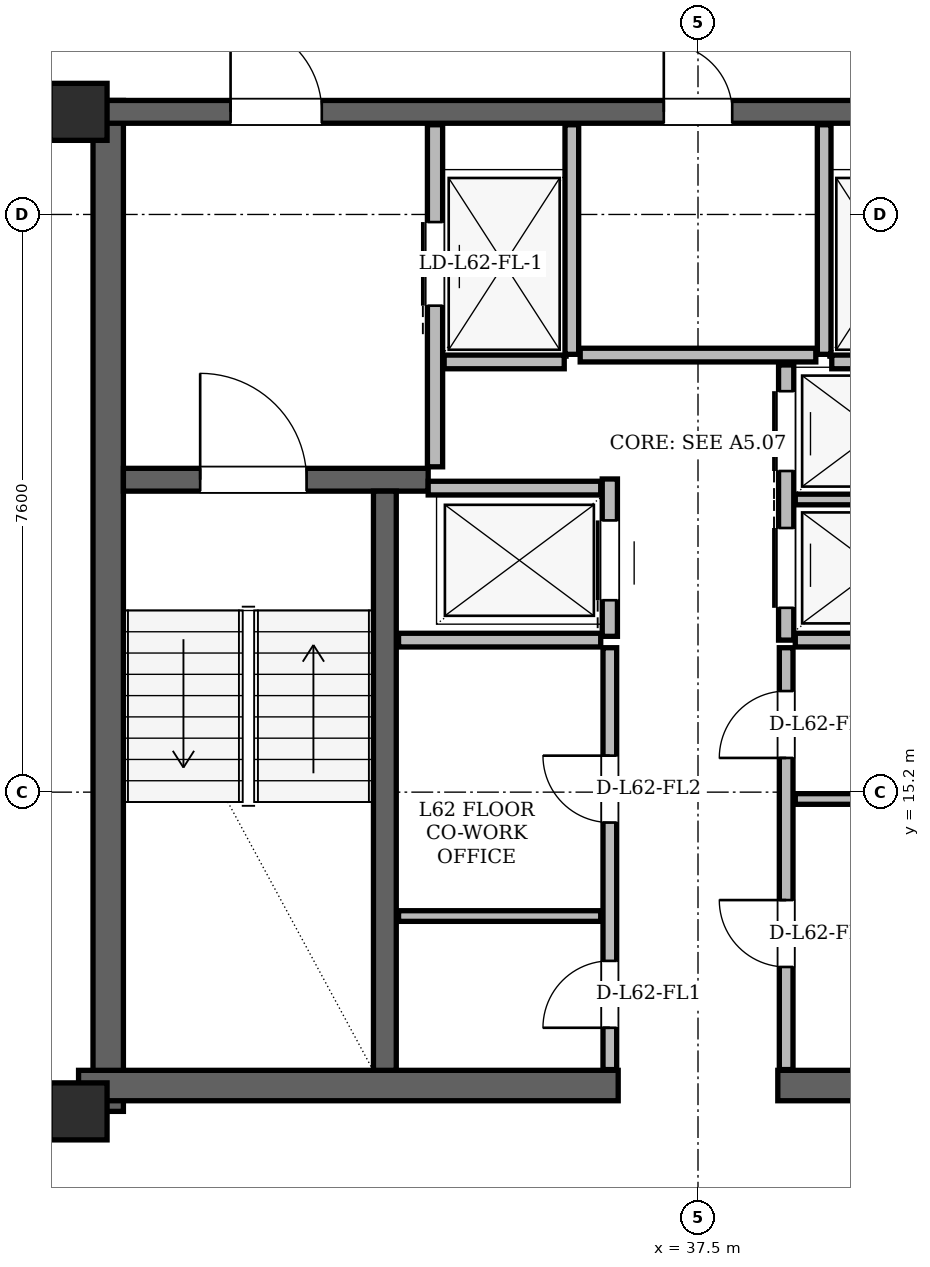
"""IFC4 building model, lengths in metres.
Left out: names, types, materials, properties, quantities, classifications, styles, units other than length and angle.
Written with IfcOpenShell. Run it as: python <this file> out.ifc"""

import sys

from ifc_helpers import new_model, si_unit, direction, frame, frame_2d, origin, origin_2d, place, context, subcontext, project, spatial, rectangle, hollow_rectangle, extrude, element, fill, save


model = new_model("IFC4")
c1 = context("Model", 3, precision=1e-05, world=origin(), true_north=direction((0.0, 1.0)))
c2 = subcontext(c1, "Body", "Model", "MODEL_VIEW")
j1 = project(units=[si_unit("LENGTHUNIT", "METRE"), si_unit("PLANEANGLEUNIT", "RADIAN")], contexts=[c1])
p1 = place(None, origin())
s1 = spatial("IfcSite", under=j1, at=p1, CompositionType="ELEMENT")
p2 = place(p1, origin())
s2 = spatial("IfcBuilding", under=s1, at=p2, CompositionType="ELEMENT")
p3 = place(p2, frame((0.0, 0.0, 234.3)))
s3 = spatial("IfcBuildingStorey", under=s2, at=p3, CompositionType="ELEMENT", Elevation=234.3)
for number, where, z_axis, x_axis in (
    (1, (29.35, 11.0, 0.0), (0.0, 0.0, 1.0), (1.0, 0.0, 0.0)),
    (2, (29.35, 24.15, 0.0), (0.0, 0.0, 1.0), (1.0, 0.0, 0.0)),
):
    element("IfcColumn", number, at=place(p3, frame(where, z_axis=z_axis, x_axis=x_axis)), inside=s3, PredefinedType="COLUMN", context=c2, shape_type="SweptSolid", body=[
        extrude(hollow_rectangle(XDim=0.75, YDim=0.75, WallThickness=0.06, at=origin_2d()), origin(), (0.0, 0.0, 1.0), 3.6),
    ])
p4 = place(p3, frame((29.74, 11.0, 0.0), z_axis=(0.0, 0.0, 1.0), x_axis=(0.0, 1.0, 0.0)))
e3 = element("IfcWall", 3, at=p4, inside=s3, PredefinedType="SHEAR", context=c2, shape_type="SweptSolid", body=[
    extrude(rectangle(XDim=13.3, YDim=0.4, at=frame_2d((6.65, 0.0))), origin(), (0.0, 0.0, 1.0), 3.38),
])
for number, where, z_axis, x_axis in (
    (4, (29.35, 11.34, 0.0), (0.0, 0.0, 1.0), (1.0, 0.0, 0.0)),
    (5, (38.55, 11.34, 0.0), (0.0, 0.0, 1.0), (1.0, 0.0, 0.0)),
):
    element("IfcWall", number, at=place(p3, frame(where, z_axis=z_axis, x_axis=x_axis)), inside=s3, PredefinedType="SHEAR", context=c2, shape_type="SweptSolid", body=[
        extrude(rectangle(XDim=7.1, YDim=0.4, at=frame_2d((3.55, 0.0))), origin(), (0.0, 0.0, 1.0), 3.38),
    ])
p5 = place(p3, frame((29.65, 24.15, 0.0), z_axis=(0.0, 0.0, 1.0), x_axis=(1.0, 0.0, 0.0)))
e6 = element("IfcWall", 6, at=p5, inside=s3, PredefinedType="SHEAR", context=c2, shape_type="SweptSolid", body=[
    extrude(rectangle(XDim=15.7, YDim=0.3, at=frame_2d((7.85, 0.0))), origin(), (0.0, 0.0, 1.0), 3.38),
])
p6 = place(p5, frame((1.7, 0.0, 0.0)))
e7 = element("IfcOpeningElement", 7, at=p6, cuts=e6, PredefinedType="OPENING", context=c2, shape_type="SweptSolid", body=[
    extrude(rectangle(XDim=1.2, YDim=2.2, at=frame_2d((0.6, 1.1))), frame((0.0, 0.15, 0.0), z_axis=(0.0, -1.0, 0.0), x_axis=(1.0, 0.0, 0.0)), (0.0, 0.0, 1.0), 0.3),
])
p7 = place(p5, frame((12.8, 0.0, 0.0)))
e8 = element("IfcOpeningElement", 8, at=p7, cuts=e6, PredefinedType="OPENING", context=c2, shape_type="SweptSolid", body=[
    extrude(rectangle(XDim=1.2, YDim=2.2, at=frame_2d((0.6, 1.1))), frame((0.0, 0.15, 0.0), z_axis=(0.0, -1.0, 0.0), x_axis=(1.0, 0.0, 0.0)), (0.0, 0.0, 1.0), 0.3),
])
p8 = place(p5, frame((7.4, 0.0, 0.0)))
e9 = element("IfcOpeningElement", 9, at=p8, cuts=e6, PredefinedType="OPENING", context=c2, shape_type="SweptSolid", body=[
    extrude(rectangle(XDim=0.9, YDim=2.05, at=frame_2d((0.45, 1.025))), frame((0.0, 0.15, 0.0), z_axis=(0.0, -1.0, 0.0), x_axis=(1.0, 0.0, 0.0)), (0.0, 0.0, 1.0), 0.3),
])
p9 = place(p3, frame((29.94, 19.31, 0.0), z_axis=(0.0, 0.0, 1.0), x_axis=(1.0, 0.0, 0.0)))
e10 = element("IfcWall", 10, at=p9, inside=s3, PredefinedType="SHEAR", context=c2, shape_type="SweptSolid", body=[
    extrude(rectangle(XDim=4.01, YDim=0.3, at=frame_2d((2.005, 0.0))), origin(), (0.0, 0.0, 1.0), 3.38),
])
p10 = place(p9, frame((1.01, 0.0, 0.0)))
e11 = element("IfcOpeningElement", 11, at=p10, cuts=e10, PredefinedType="OPENING", context=c2, shape_type="SweptSolid", body=[
    extrude(rectangle(XDim=1.4, YDim=2.2, at=frame_2d((0.7, 1.1))), frame((0.0, 0.15, 0.0), z_axis=(0.0, -1.0, 0.0), x_axis=(1.0, 0.0, 0.0)), (0.0, 0.0, 1.0), 0.3),
])
p11 = place(p3, frame((33.38, 11.54, 0.0), z_axis=(0.0, 0.0, 1.0), x_axis=(0.0, 1.0, 0.0)))
e12 = element("IfcWall", 12, at=p11, inside=s3, PredefinedType="SHEAR", context=c2, shape_type="SweptSolid", body=[
    extrude(rectangle(XDim=7.62, YDim=0.3, at=frame_2d((3.81, 0.0))), origin(), (0.0, 0.0, 1.0), 3.38),
])
p12 = place(p3, frame((34.482, 43.116, 0.0), z_axis=(0.0, 0.0, 1.0), x_axis=(-0.500000614513, -0.866025048995, 0.0)))
e13 = element("IfcWall", 13, at=p12, inside=s3, PredefinedType="SOLIDWALL", context=c2, shape_type="SweptSolid", body=[
    extrude(rectangle(XDim=36.848, YDim=0.29, at=frame_2d((18.424, 0.0))), origin(), (0.0, 0.0, 1.0), 2.677),
])
p13 = place(p12, frame((8.034, 0.0, 0.0)))
e14 = element("IfcOpeningElement", 14, at=p13, cuts=e13, PredefinedType="OPENING", context=c2, shape_type="SweptSolid", body=[
    extrude(rectangle(XDim=1.5, YDim=2.2, at=frame_2d((0.75, 1.1))), frame((0.0, 0.145, 0.0), z_axis=(0.0, -1.0, 0.0), x_axis=(1.0, 0.0, 0.0)), (0.0, 0.0, 1.0), 0.29),
])
p14 = place(p12, frame((28.559, 0.0, 0.0)))
e15 = element("IfcOpeningElement", 15, at=p14, cuts=e13, PredefinedType="OPENING", context=c2, shape_type="SweptSolid", body=[
    extrude(rectangle(XDim=1.5, YDim=2.2, at=frame_2d((0.75, 1.1))), frame((0.0, 0.145, 0.0), z_axis=(0.0, -1.0, 0.0), x_axis=(1.0, 0.0, 0.0)), (0.0, 0.0, 1.0), 0.29),
])
p15 = place(p12, frame((21.863, 0.0, 0.85)))
e16 = element("IfcOpeningElement", 16, at=p15, cuts=e13, PredefinedType="OPENING", context=c2, shape_type="SweptSolid", body=[
    extrude(rectangle(XDim=2.4, YDim=1.717, at=frame_2d((1.2, 0.858))), frame((0.0, 0.145, 0.0), z_axis=(0.0, -1.0, 0.0), x_axis=(1.0, 0.0, 0.0)), (0.0, 0.0, 1.0), 0.29),
])
p16 = place(p12, frame((34.677, 0.0, 0.85)))
e17 = element("IfcOpeningElement", 17, at=p16, cuts=e13, PredefinedType="OPENING", context=c2, shape_type="SweptSolid", body=[
    extrude(rectangle(XDim=1.2, YDim=1.48, at=frame_2d((0.6, 0.74))), frame((0.0, 0.145, 0.0), z_axis=(0.0, -1.0, 0.0), x_axis=(1.0, 0.0, 0.0)), (0.0, 0.0, 1.0), 0.29),
])
p17 = place(p12, frame((32.477, 0.0, 0.85)))
e18 = element("IfcOpeningElement", 18, at=p17, cuts=e13, PredefinedType="OPENING", context=c2, shape_type="SweptSolid", body=[
    extrude(rectangle(XDim=1.4, YDim=1.6, at=frame_2d((0.7, 0.8))), frame((0.0, 0.145, 0.0), z_axis=(0.0, -1.0, 0.0), x_axis=(1.0, 0.0, 0.0)), (0.0, 0.0, 1.0), 0.29),
])
p18 = place(p12, frame((12.14, 0.0, 0.85)))
e19 = element("IfcOpeningElement", 19, at=p18, cuts=e13, PredefinedType="OPENING", context=c2, shape_type="SweptSolid", body=[
    extrude(rectangle(XDim=1.2, YDim=1.48, at=frame_2d((0.6, 0.74))), frame((0.0, 0.145, 0.0), z_axis=(0.0, -1.0, 0.0), x_axis=(1.0, 0.0, 0.0)), (0.0, 0.0, 1.0), 0.29),
])
p19 = place(p12, frame((16.54, 0.0, 0.85)))
e20 = element("IfcOpeningElement", 20, at=p19, cuts=e13, PredefinedType="OPENING", context=c2, shape_type="SweptSolid", body=[
    extrude(rectangle(XDim=2.0, YDim=1.717, at=frame_2d((1.0, 0.858))), frame((0.0, 0.145, 0.0), z_axis=(0.0, -1.0, 0.0), x_axis=(1.0, 0.0, 0.0)), (0.0, 0.0, 1.0), 0.29),
])
p20 = place(p12, frame((2.059, 0.0, 0.85)))
e21 = element("IfcOpeningElement", 21, at=p20, cuts=e13, PredefinedType="OPENING", context=c2, shape_type="SweptSolid", body=[
    extrude(rectangle(XDim=1.2, YDim=1.48, at=frame_2d((0.6, 0.74))), frame((0.0, 0.145, 0.0), z_axis=(0.0, -1.0, 0.0), x_axis=(1.0, 0.0, 0.0)), (0.0, 0.0, 1.0), 0.29),
])
p21 = place(p3, frame((34.04, 19.48, 0.0), z_axis=(0.0, 0.0, 1.0), x_axis=(0.0, 1.0, 0.0)))
e22 = element("IfcWall", 22, at=p21, inside=s3, PredefinedType="PARTITIONING", context=c2, shape_type="SweptSolid", body=[
    extrude(rectangle(XDim=4.5, YDim=0.2, at=frame_2d((2.25, 0.0))), origin(), (0.0, 0.0, 1.0), 3.38),
])
p22 = place(p21, frame((2.12, 0.0, 0.0)))
e23 = element("IfcOpeningElement", 23, at=p22, cuts=e22, PredefinedType="OPENING", context=c2, shape_type="SweptSolid", body=[
    extrude(rectangle(XDim=1.1, YDim=2.2, at=frame_2d((0.55, 1.1))), frame((0.0, 0.1, 0.0), z_axis=(0.0, -1.0, 0.0), x_axis=(1.0, 0.0, 0.0)), (0.0, 0.0, 1.0), 0.2),
])
p23 = place(p3, frame((35.84, 20.96, 0.0), z_axis=(0.0, 0.0, 1.0), x_axis=(0.0, 1.0, 0.0)))
e24 = element("IfcWall", 24, at=p23, inside=s3, PredefinedType="PARTITIONING", context=c2, shape_type="SweptSolid", body=[
    extrude(rectangle(XDim=3.02, YDim=0.18, at=frame_2d((1.51, 0.0))), origin(), (0.0, 0.0, 1.0), 3.38),
])
p24 = place(p3, frame((34.16, 20.86, 0.0), z_axis=(0.0, 0.0, 1.0), x_axis=(1.0, 0.0, 0.0)))
e25 = element("IfcWall", 25, at=p24, inside=s3, PredefinedType="PARTITIONING", context=c2, shape_type="SweptSolid", body=[
    extrude(rectangle(XDim=1.58, YDim=0.18, at=frame_2d((0.79, 0.0))), origin(), (0.0, 0.0, 1.0), 3.38),
])
p25 = place(p3, frame((39.16, 20.96, 0.0), z_axis=(0.0, 0.0, 1.0), x_axis=(0.0, 1.0, 0.0)))
e26 = element("IfcWall", 26, at=p25, inside=s3, PredefinedType="PARTITIONING", context=c2, shape_type="SweptSolid", body=[
    extrude(rectangle(XDim=3.02, YDim=0.18, at=frame_2d((1.51, 0.0))), origin(), (0.0, 0.0, 1.0), 3.38),
])
p26 = place(p3, frame((39.26, 20.86, 0.0), z_axis=(0.0, 0.0, 1.0), x_axis=(1.0, 0.0, 0.0)))
e27 = element("IfcWall", 27, at=p26, inside=s3, PredefinedType="PARTITIONING", context=c2, shape_type="SweptSolid", body=[
    extrude(rectangle(XDim=1.58, YDim=0.18, at=frame_2d((0.79, 0.0))), origin(), (0.0, 0.0, 1.0), 3.38),
])
p27 = place(p3, frame((36.34, 17.25, 0.0), z_axis=(0.0, 0.0, 1.0), x_axis=(0.0, 1.0, 0.0)))
e28 = element("IfcWall", 28, at=p27, inside=s3, PredefinedType="PARTITIONING", context=c2, shape_type="SweptSolid", body=[
    extrude(rectangle(XDim=2.07, YDim=0.2, at=frame_2d((1.035, 0.0))), origin(), (0.0, 0.0, 1.0), 3.38),
])
p28 = place(p27, frame((0.475, 0.0, 0.0)))
e29 = element("IfcOpeningElement", 29, at=p28, cuts=e28, PredefinedType="OPENING", context=c2, shape_type="SweptSolid", body=[
    extrude(rectangle(XDim=1.05, YDim=2.15, at=frame_2d((0.525, 1.075))), frame((0.0, 0.1, 0.0), z_axis=(0.0, -1.0, 0.0), x_axis=(1.0, 0.0, 0.0)), (0.0, 0.0, 1.0), 0.2),
])
p29 = place(p3, frame((33.95, 19.2, 0.0), z_axis=(0.0, 0.0, 1.0), x_axis=(1.0, 0.0, 0.0)))
e30 = element("IfcWall", 30, at=p29, inside=s3, PredefinedType="PARTITIONING", context=c2, shape_type="SweptSolid", body=[
    extrude(rectangle(XDim=2.27, YDim=0.18, at=frame_2d((1.135, 0.0))), origin(), (0.0, 0.0, 1.0), 3.38),
])
p30 = place(p3, frame((33.56, 17.2, 0.0), z_axis=(0.0, 0.0, 1.0), x_axis=(1.0, 0.0, 0.0)))
e31 = element("IfcWall", 31, at=p30, inside=s3, PredefinedType="PARTITIONING", context=c2, shape_type="SweptSolid", body=[
    extrude(rectangle(XDim=2.66, YDim=0.18, at=frame_2d((1.33, 0.0))), origin(), (0.0, 0.0, 1.0), 3.38),
])
p31 = place(p3, frame((36.34, 11.55, 0.0), z_axis=(0.0, 0.0, 1.0), x_axis=(0.0, 1.0, 0.0)))
e32 = element("IfcWall", 32, at=p31, inside=s3, PredefinedType="PARTITIONING", context=c2, shape_type="SweptSolid", body=[
    extrude(rectangle(XDim=5.55, YDim=0.18, at=frame_2d((2.775, 0.0))), origin(), (0.0, 0.0, 1.0), 3.38),
])
p32 = place(p31, frame((0.55, 0.0, 0.0)))
e33 = element("IfcOpeningElement", 33, at=p32, cuts=e32, PredefinedType="OPENING", context=c2, shape_type="SweptSolid", body=[
    extrude(rectangle(XDim=0.88, YDim=2.08, at=frame_2d((0.44, 1.04))), frame((0.0, 0.09, 0.0), z_axis=(0.0, -1.0, 0.0), x_axis=(1.0, 0.0, 0.0)), (0.0, 0.0, 1.0), 0.18),
])
p33 = place(p31, frame((3.25, 0.0, 0.0)))
e34 = element("IfcOpeningElement", 34, at=p33, cuts=e32, PredefinedType="OPENING", context=c2, shape_type="SweptSolid", body=[
    extrude(rectangle(XDim=0.88, YDim=2.08, at=frame_2d((0.44, 1.04))), frame((0.0, 0.09, 0.0), z_axis=(0.0, -1.0, 0.0), x_axis=(1.0, 0.0, 0.0)), (0.0, 0.0, 1.0), 0.18),
])
p34 = place(p3, frame((33.56, 13.57, 0.0), z_axis=(0.0, 0.0, 1.0), x_axis=(1.0, 0.0, 0.0)))
e35 = element("IfcWall", 35, at=p34, inside=s3, PredefinedType="PARTITIONING", context=c2, shape_type="SweptSolid", body=[
    extrude(rectangle(XDim=2.66, YDim=0.14, at=frame_2d((1.33, 0.0))), origin(), (0.0, 0.0, 1.0), 3.38),
])
p35 = place(p3, frame((38.66, 17.2, 0.0), z_axis=(0.0, 0.0, 1.0), x_axis=(0.0, 1.0, 0.0)))
e36 = element("IfcWall", 36, at=p35, inside=s3, PredefinedType="PARTITIONING", context=c2, shape_type="SweptSolid", body=[
    extrude(rectangle(XDim=3.62, YDim=0.2, at=frame_2d((1.81, 0.0))), origin(), (0.0, 0.0, 1.0), 3.38),
])
p36 = place(p35, frame((0.425, 0.0, 0.0)))
e37 = element("IfcOpeningElement", 37, at=p36, cuts=e36, PredefinedType="OPENING", context=c2, shape_type="SweptSolid", body=[
    extrude(rectangle(XDim=1.05, YDim=2.15, at=frame_2d((0.525, 1.075))), frame((0.0, 0.1, 0.0), z_axis=(0.0, -1.0, 0.0), x_axis=(1.0, 0.0, 0.0)), (0.0, 0.0, 1.0), 0.2),
])
p37 = place(p35, frame((2.225, 0.0, 0.0)))
e38 = element("IfcOpeningElement", 38, at=p37, cuts=e36, PredefinedType="OPENING", context=c2, shape_type="SweptSolid", body=[
    extrude(rectangle(XDim=1.05, YDim=2.15, at=frame_2d((0.525, 1.075))), frame((0.0, 0.1, 0.0), z_axis=(0.0, -1.0, 0.0), x_axis=(1.0, 0.0, 0.0)), (0.0, 0.0, 1.0), 0.2),
])
p38 = place(p3, frame((38.78, 17.2, 0.0), z_axis=(0.0, 0.0, 1.0), x_axis=(1.0, 0.0, 0.0)))
e39 = element("IfcWall", 39, at=p38, inside=s3, PredefinedType="PARTITIONING", context=c2, shape_type="SweptSolid", body=[
    extrude(rectangle(XDim=2.66, YDim=0.18, at=frame_2d((1.33, 0.0))), origin(), (0.0, 0.0, 1.0), 3.38),
])
p39 = place(p3, frame((38.78, 19.05, 0.0), z_axis=(0.0, 0.0, 1.0), x_axis=(1.0, 0.0, 0.0)))
e40 = element("IfcWall", 40, at=p39, inside=s3, PredefinedType="PARTITIONING", context=c2, shape_type="SweptSolid", body=[
    extrude(rectangle(XDim=2.66, YDim=0.14, at=frame_2d((1.33, 0.0))), origin(), (0.0, 0.0, 1.0), 3.38),
])
p40 = place(p3, frame((38.66, 11.55, 0.0), z_axis=(0.0, 0.0, 1.0), x_axis=(0.0, 1.0, 0.0)))
e41 = element("IfcWall", 41, at=p40, inside=s3, PredefinedType="PARTITIONING", context=c2, shape_type="SweptSolid", body=[
    extrude(rectangle(XDim=5.55, YDim=0.18, at=frame_2d((2.775, 0.0))), origin(), (0.0, 0.0, 1.0), 3.38),
])
p41 = place(p40, frame((1.35, 0.0, 0.0)))
e42 = element("IfcOpeningElement", 42, at=p41, cuts=e41, PredefinedType="OPENING", context=c2, shape_type="SweptSolid", body=[
    extrude(rectangle(XDim=0.88, YDim=2.08, at=frame_2d((0.44, 1.04))), frame((0.0, 0.09, 0.0), z_axis=(0.0, -1.0, 0.0), x_axis=(1.0, 0.0, 0.0)), (0.0, 0.0, 1.0), 0.18),
])
p42 = place(p40, frame((4.1, 0.0, 0.0)))
e43 = element("IfcOpeningElement", 43, at=p42, cuts=e41, PredefinedType="OPENING", context=c2, shape_type="SweptSolid", body=[
    extrude(rectangle(XDim=0.88, YDim=2.08, at=frame_2d((0.44, 1.04))), frame((0.0, 0.09, 0.0), z_axis=(0.0, -1.0, 0.0), x_axis=(1.0, 0.0, 0.0)), (0.0, 0.0, 1.0), 0.18),
])
p43 = place(p3, frame((38.78, 15.11, 0.0), z_axis=(0.0, 0.0, 1.0), x_axis=(1.0, 0.0, 0.0)))
e44 = element("IfcWall", 44, at=p43, inside=s3, PredefinedType="PARTITIONING", context=c2, shape_type="SweptSolid", body=[
    extrude(rectangle(XDim=2.66, YDim=0.14, at=frame_2d((1.33, 0.0))), origin(), (0.0, 0.0, 1.0), 3.38),
])
p44 = place(p3, frame((35.95, 20.95, 0.0), z_axis=(0.0, 0.0, 1.0), x_axis=(1.0, 0.0, 0.0)))
e45 = element("IfcWall", 45, at=p44, inside=s3, PredefinedType="PARTITIONING", context=c2, shape_type="SweptSolid", body=[
    extrude(rectangle(XDim=3.1, YDim=0.18, at=frame_2d((1.55, 0.0))), origin(), (0.0, 0.0, 1.0), 3.38),
])
p45 = place(p32, origin())
e46 = element("IfcDoor", 46, at=p45, inside=s3, OperationType="SINGLE_SWING_LEFT", PredefinedType="DOOR", context=c2, shape_type="SweptSolid", body=[
    extrude(rectangle(XDim=0.88, YDim=2.08, at=frame_2d((0.44, 1.04))), frame((0.0, 0.025, 0.0), z_axis=(0.0, -1.0, 0.0), x_axis=(1.0, 0.0, 0.0)), (0.0, 0.0, 1.0), 0.05),
])
fill(e33, e46)
p46 = place(p33, origin())
e47 = element("IfcDoor", 47, at=p46, inside=s3, OperationType="SINGLE_SWING_RIGHT", PredefinedType="DOOR", context=c2, shape_type="SweptSolid", body=[
    extrude(rectangle(XDim=0.88, YDim=2.08, at=frame_2d((0.44, 1.04))), frame((0.0, 0.025, 0.0), z_axis=(0.0, -1.0, 0.0), x_axis=(1.0, 0.0, 0.0)), (0.0, 0.0, 1.0), 0.05),
])
fill(e34, e47)
p47 = place(p41, origin())
e48 = element("IfcDoor", 48, at=p47, inside=s3, OperationType="SINGLE_SWING_RIGHT", PredefinedType="DOOR", context=c2, shape_type="SweptSolid", body=[
    extrude(rectangle(XDim=0.88, YDim=2.08, at=frame_2d((0.44, 1.04))), frame((0.0, 0.025, 0.0), z_axis=(0.0, -1.0, 0.0), x_axis=(1.0, 0.0, 0.0)), (0.0, 0.0, 1.0), 0.05),
])
fill(e42, e48)
p48 = place(p42, origin())
e49 = element("IfcDoor", 49, at=p48, inside=s3, OperationType="SINGLE_SWING_LEFT", PredefinedType="DOOR", context=c2, shape_type="SweptSolid", body=[
    extrude(rectangle(XDim=0.88, YDim=2.08, at=frame_2d((0.44, 1.04))), frame((0.0, 0.025, 0.0), z_axis=(0.0, -1.0, 0.0), x_axis=(1.0, 0.0, 0.0)), (0.0, 0.0, 1.0), 0.05),
])
fill(e43, e49)
p49 = place(p22, origin())
e50 = element("IfcDoor", 50, at=p49, inside=s3, OperationType="SLIDING_TO_LEFT", PredefinedType="DOOR", context=c2, shape_type="SweptSolid", body=[
    extrude(rectangle(XDim=1.1, YDim=2.2, at=frame_2d((0.55, 1.1))), frame((0.0, 0.025, 0.0), z_axis=(0.0, -1.0, 0.0), x_axis=(1.0, 0.0, 0.0)), (0.0, 0.0, 1.0), 0.05),
])
fill(e23, e50)
p50 = place(p28, origin())
e51 = element("IfcDoor", 51, at=p50, inside=s3, OperationType="SLIDING_TO_LEFT", PredefinedType="DOOR", context=c2, shape_type="SweptSolid", body=[
    extrude(rectangle(XDim=1.05, YDim=2.15, at=frame_2d((0.525, 1.075))), frame((0.0, 0.025, 0.0), z_axis=(0.0, -1.0, 0.0), x_axis=(1.0, 0.0, 0.0)), (0.0, 0.0, 1.0), 0.05),
])
fill(e29, e51)
p51 = place(p36, origin())
e52 = element("IfcDoor", 52, at=p51, inside=s3, OperationType="SLIDING_TO_RIGHT", PredefinedType="DOOR", context=c2, shape_type="SweptSolid", body=[
    extrude(rectangle(XDim=1.05, YDim=2.15, at=frame_2d((0.525, 1.075))), frame((0.0, 0.025, 0.0), z_axis=(0.0, -1.0, 0.0), x_axis=(1.0, 0.0, 0.0)), (0.0, 0.0, 1.0), 0.05),
])
fill(e37, e52)
p52 = place(p37, origin())
e53 = element("IfcDoor", 53, at=p52, inside=s3, OperationType="SLIDING_TO_LEFT", PredefinedType="DOOR", context=c2, shape_type="SweptSolid", body=[
    extrude(rectangle(XDim=1.05, YDim=2.15, at=frame_2d((0.525, 1.075))), frame((0.0, 0.025, 0.0), z_axis=(0.0, -1.0, 0.0), x_axis=(1.0, 0.0, 0.0)), (0.0, 0.0, 1.0), 0.05),
])
fill(e38, e53)
p53 = place(p10, origin())
e54 = element("IfcDoor", 54, at=p53, inside=s3, OperationType="SINGLE_SWING_LEFT", PredefinedType="DOOR", context=c2, shape_type="SweptSolid", body=[
    extrude(rectangle(XDim=1.4, YDim=2.2, at=frame_2d((0.7, 1.1))), frame((0.0, 0.025, 0.0), z_axis=(0.0, -1.0, 0.0), x_axis=(1.0, 0.0, 0.0)), (0.0, 0.0, 1.0), 0.05),
])
fill(e11, e54)
p54 = place(p6, origin())
e55 = element("IfcDoor", 55, at=p54, inside=s3, OperationType="SINGLE_SWING_LEFT", PredefinedType="DOOR", context=c2, shape_type="SweptSolid", body=[
    extrude(rectangle(XDim=1.2, YDim=2.2, at=frame_2d((0.6, 1.1))), frame((0.0, 0.025, 0.0), z_axis=(0.0, -1.0, 0.0), x_axis=(1.0, 0.0, 0.0)), (0.0, 0.0, 1.0), 0.05),
])
fill(e7, e55)
p55 = place(p8, origin())
e56 = element("IfcDoor", 56, at=p55, inside=s3, OperationType="SINGLE_SWING_LEFT", PredefinedType="DOOR", context=c2, shape_type="SweptSolid", body=[
    extrude(rectangle(XDim=0.9, YDim=2.05, at=frame_2d((0.45, 1.025))), frame((0.0, 0.025, 0.0), z_axis=(0.0, -1.0, 0.0), x_axis=(1.0, 0.0, 0.0)), (0.0, 0.0, 1.0), 0.05),
])
fill(e9, e56)
save(model, sys.argv[1])
